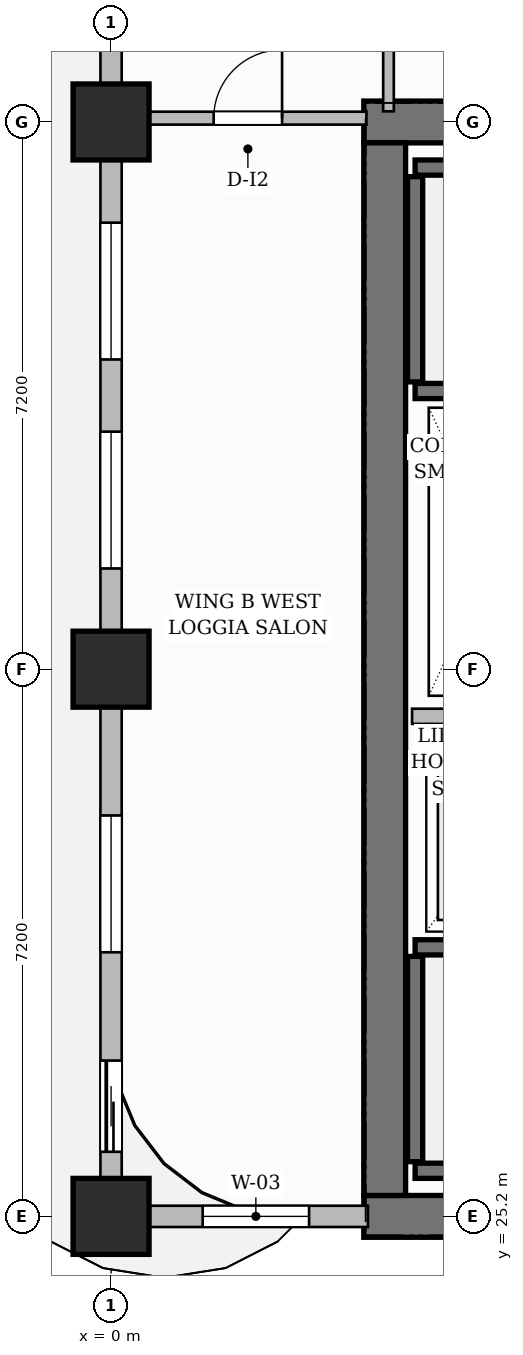
"""IFC4 building model, lengths in metres.
Left out: names, types, materials, properties, quantities, classifications, styles, units other than length and angle.
Written with IfcOpenShell. Run it as: python <this file> out.ifc"""

import sys

from ifc_helpers import new_model, si_unit, direction, frame, frame_2d, origin, origin_2d, place, context, subcontext, project, spatial, rectangle, extrude, source, transform, mapped, element, fill, save


model = new_model("IFC4")
c1 = context("Model", 3, precision=1e-05, world=origin(), true_north=direction((0.0, 1.0)))
c2 = subcontext(c1, "Body", "Model", "MODEL_VIEW")
j1 = project(units=[si_unit("LENGTHUNIT", "METRE"), si_unit("PLANEANGLEUNIT", "RADIAN")], contexts=[c1])
p1 = place(None, origin())
s1 = spatial("IfcSite", under=j1, at=p1, CompositionType="ELEMENT")
p2 = place(p1, origin())
s2 = spatial("IfcBuilding", under=s1, at=p2, CompositionType="ELEMENT")
p3 = place(p2, frame((0.0, 0.0, 126.6)))
s3 = spatial("IfcBuildingStorey", under=s2, at=p3, CompositionType="ELEMENT", Elevation=126.6)
for number, where, z_axis, x_axis in (
    (1, (3.325, 25.2, 0.0), (0.0, 0.0, 1.0), (1.0, 0.0, 0.0)),
    (2, (3.325, 39.6, 0.0), (0.0, 0.0, 1.0), (1.0, 0.0, 0.0)),
):
    element("IfcWall", number, at=place(p3, frame(where, z_axis=z_axis, x_axis=x_axis)), inside=s3, PredefinedType="SHEAR", context=c2, shape_type="SweptSolid", body=[
        extrude(rectangle(XDim=8.35, YDim=0.55, at=frame_2d((4.175, 0.0))), origin(), (0.0, 0.0, 1.0), 3.7),
    ])
p4 = place(p3, frame((3.6, 25.475, 0.0), z_axis=(0.0, 0.0, 1.0), x_axis=(0.0, 1.0, 0.0)))
e3 = element("IfcWall", 3, at=p4, inside=s3, PredefinedType="SHEAR", context=c2, shape_type="SweptSolid", body=[
    extrude(rectangle(XDim=13.85, YDim=0.55, at=frame_2d((6.925, 0.0))), origin(), (0.0, 0.0, 1.0), 3.7),
])
m1 = source(origin(), c2, "Body", "SweptSolid", [
    extrude(rectangle(XDim=1.0, YDim=1.0, at=origin_2d()), origin(), (0.0, 0.0, 1.0), 3.7),
])
for number, where, z_axis, x_axis in (
    (4, (0.0, 25.2, 0.0), (0.0, 0.0, 1.0), (1.0, 0.0, 0.0)),
    (5, (0.0, 32.4, 0.0), (0.0, 0.0, 1.0), (1.0, 0.0, 0.0)),
    (6, (0.0, 39.6, 0.0), (0.0, 0.0, 1.0), (1.0, 0.0, 0.0)),
):
    element("IfcColumn", number, at=place(p3, frame(where, z_axis=z_axis, x_axis=x_axis)), inside=s3, PredefinedType="COLUMN", context=c2, shape_type="MappedRepresentation", body=[
        mapped(m1, transform((0.0, 0.0, 0.0), scale=1.0)),
    ])
p5 = place(p3, frame((4.0, 25.8, 0.0), z_axis=(0.0, 0.0, 1.0), x_axis=(1.0, 0.0, 0.0)))
e7 = element("IfcWall", 7, at=p5, inside=s3, PredefinedType="SHEAR", context=c2, shape_type="SweptSolid", body=[
    extrude(rectangle(XDim=7.1, YDim=0.2, at=frame_2d((3.55, 0.0))), origin(), (0.0, 0.0, 1.0), 3.7),
])
p6 = place(p3, frame((4.0, 25.92, 0.0), z_axis=(0.0, 0.0, 1.0), x_axis=(0.0, 1.0, 0.0)))
e8 = element("IfcWall", 8, at=p6, inside=s3, PredefinedType="SHEAR", context=c2, shape_type="SweptSolid", body=[
    extrude(rectangle(XDim=2.7, YDim=0.2, at=frame_2d((1.35, 0.0))), origin(), (0.0, 0.0, 1.0), 3.7),
])
p7 = place(p3, frame((4.0, 28.74, 0.0), z_axis=(0.0, 0.0, 1.0), x_axis=(1.0, 0.0, 0.0)))
e9 = element("IfcWall", 9, at=p7, inside=s3, PredefinedType="SHEAR", context=c2, shape_type="SweptSolid", body=[
    extrude(rectangle(XDim=7.1, YDim=0.2, at=frame_2d((3.55, 0.0))), origin(), (0.0, 0.0, 1.0), 3.7),
])
p8 = place(p7, frame((5.815, 0.0, 0.0)))
e10 = element("IfcOpeningElement", 10, at=p8, cuts=e9, PredefinedType="OPENING", context=c2, shape_type="SweptSolid", body=[
    extrude(rectangle(XDim=1.05, YDim=2.2, at=frame_2d((0.525, 1.1))), frame((0.0, 0.11, 0.0), z_axis=(0.0, -1.0, 0.0), x_axis=(1.0, 0.0, 0.0)), (0.0, 0.0, 1.0), 0.22),
])
p9 = place(p3, frame((4.0, 39.0, 0.0), z_axis=(0.0, 0.0, 1.0), x_axis=(1.0, 0.0, 0.0)))
e11 = element("IfcWall", 11, at=p9, inside=s3, PredefinedType="SHEAR", context=c2, shape_type="SweptSolid", body=[
    extrude(rectangle(XDim=7.1, YDim=0.2, at=frame_2d((3.55, 0.0))), origin(), (0.0, 0.0, 1.0), 3.7),
])
p10 = place(p3, frame((4.0, 36.18, 0.0), z_axis=(0.0, 0.0, 1.0), x_axis=(0.0, 1.0, 0.0)))
e12 = element("IfcWall", 12, at=p10, inside=s3, PredefinedType="SHEAR", context=c2, shape_type="SweptSolid", body=[
    extrude(rectangle(XDim=2.7, YDim=0.2, at=frame_2d((1.35, 0.0))), origin(), (0.0, 0.0, 1.0), 3.7),
])
p11 = place(p3, frame((4.0, 36.06, 0.0), z_axis=(0.0, 0.0, 1.0), x_axis=(1.0, 0.0, 0.0)))
e13 = element("IfcWall", 13, at=p11, inside=s3, PredefinedType="SHEAR", context=c2, shape_type="SweptSolid", body=[
    extrude(rectangle(XDim=7.1, YDim=0.2, at=frame_2d((3.55, 0.0))), origin(), (0.0, 0.0, 1.0), 3.7),
])
p12 = place(p11, frame((5.815, 0.0, 0.0)))
e14 = element("IfcOpeningElement", 14, at=p12, cuts=e13, PredefinedType="OPENING", context=c2, shape_type="SweptSolid", body=[
    extrude(rectangle(XDim=1.05, YDim=2.2, at=frame_2d((0.525, 1.1))), frame((0.0, 0.11, 0.0), z_axis=(0.0, -1.0, 0.0), x_axis=(1.0, 0.0, 0.0)), (0.0, 0.0, 1.0), 0.22),
])
p13 = place(p3, frame((3.96, 31.78, 0.0), z_axis=(0.0, 0.0, 1.0), x_axis=(1.0, 0.0, 0.0)))
e15 = element("IfcWall", 15, at=p13, inside=s3, PredefinedType="PARTITIONING", context=c2, shape_type="SweptSolid", body=[
    extrude(rectangle(XDim=2.13, YDim=0.2, at=frame_2d((1.065, 0.0))), origin(), (0.0, 0.0, 1.0), 3.45),
])
p14 = place(p3, frame((0.24, 39.65, 0.0), z_axis=(0.0, 0.0, 1.0), x_axis=(1.0, 0.0, 0.0)))
e16 = element("IfcWall", 16, at=p14, inside=s3, PredefinedType="PARTITIONING", context=c2, shape_type="SweptSolid", body=[
    extrude(rectangle(XDim=3.12, YDim=0.17, at=frame_2d((1.56, 0.0))), origin(), (0.0, 0.0, 1.0), 3.45),
])
p15 = place(p14, frame((1.11, 0.0, 0.0)))
e17 = element("IfcOpeningElement", 17, at=p15, cuts=e16, PredefinedType="OPENING", context=c2, shape_type="SweptSolid", body=[
    extrude(rectangle(XDim=0.9, YDim=2.15, at=frame_2d((0.45, 1.075))), frame((0.0, 0.095, 0.0), z_axis=(0.0, -1.0, 0.0), x_axis=(1.0, 0.0, 0.0)), (0.0, 0.0, 1.0), 0.19),
])
p16 = place(p3, frame((3.65, 39.74, 0.0), z_axis=(0.0, 0.0, 1.0), x_axis=(0.0, 1.0, 0.0)))
e18 = element("IfcWall", 18, at=p16, inside=s3, PredefinedType="PARTITIONING", context=c2, shape_type="SweptSolid", body=[
    extrude(rectangle(XDim=1.745, YDim=0.14, at=frame_2d((0.873, 0.0))), origin(), (0.0, 0.0, 1.0), 3.45),
])
p17 = place(p3, frame((0.0, 25.2, 0.0), z_axis=(0.0, 0.0, 1.0), x_axis=(1.0, 0.0, 0.0)))
e19 = element("IfcWall", 19, at=p17, inside=s3, PredefinedType="SOLIDWALL", context=c2, shape_type="SweptSolid", body=[
    extrude(rectangle(XDim=3.38, YDim=0.28, at=frame_2d((1.69, 0.0))), origin(), (0.0, 0.0, 1.0), 3.45),
])
p18 = place(p17, frame((1.205, 0.0, 0.8)))
e20 = element("IfcOpeningElement", 20, at=p18, cuts=e19, PredefinedType="OPENING", context=c2, shape_type="SweptSolid", body=[
    extrude(rectangle(XDim=1.4, YDim=1.85, at=frame_2d((0.7, 0.925))), frame((0.0, 0.15, 0.0), z_axis=(0.0, -1.0, 0.0), x_axis=(1.0, 0.0, 0.0)), (0.0, 0.0, 1.0), 0.3),
])
p19 = place(p3, frame((0.0, 25.25, 0.0), z_axis=(0.0, 0.0, 1.0), x_axis=(0.0, 1.0, 0.0)))
e21 = element("IfcWall", 21, at=p19, inside=s3, PredefinedType="SOLIDWALL", context=c2, shape_type="SweptSolid", body=[
    extrude(rectangle(XDim=21.5, YDim=0.28, at=frame_2d((10.75, 0.0))), origin(), (0.0, 0.0, 1.0), 2.935),
])
p20 = place(p19, frame((18.607, 0.0, 0.0)))
e22 = element("IfcOpeningElement", 22, at=p20, cuts=e21, PredefinedType="OPENING", context=c2, shape_type="SweptSolid", body=[
    extrude(rectangle(XDim=1.2, YDim=2.2, at=frame_2d((0.6, 1.1))), frame((0.0, 0.15, 0.0), z_axis=(0.0, -1.0, 0.0), x_axis=(1.0, 0.0, 0.0)), (0.0, 0.0, 1.0), 0.3),
])
p21 = place(p19, frame((0.8, 0.0, 0.0)))
e23 = element("IfcOpeningElement", 23, at=p21, cuts=e21, PredefinedType="OPENING", context=c2, shape_type="SweptSolid", body=[
    extrude(rectangle(XDim=1.2, YDim=2.2, at=frame_2d((0.6, 1.1))), frame((0.0, 0.15, 0.0), z_axis=(0.0, -1.0, 0.0), x_axis=(1.0, 0.0, 0.0)), (0.0, 0.0, 1.0), 0.3),
])
p22 = place(p19, frame((3.425, 0.0, 0.8)))
e24 = element("IfcOpeningElement", 24, at=p22, cuts=e21, PredefinedType="OPENING", context=c2, shape_type="SweptSolid", body=[
    extrude(rectangle(XDim=1.8, YDim=1.85, at=frame_2d((0.9, 0.925))), frame((0.0, 0.15, 0.0), z_axis=(0.0, -1.0, 0.0), x_axis=(1.0, 0.0, 0.0)), (0.0, 0.0, 1.0), 0.3),
])
p23 = place(p19, frame((8.475, 0.0, 0.8)))
e25 = element("IfcOpeningElement", 25, at=p23, cuts=e21, PredefinedType="OPENING", context=c2, shape_type="SweptSolid", body=[
    extrude(rectangle(XDim=1.8, YDim=1.85, at=frame_2d((0.9, 0.925))), frame((0.0, 0.15, 0.0), z_axis=(0.0, -1.0, 0.0), x_axis=(1.0, 0.0, 0.0)), (0.0, 0.0, 1.0), 0.3),
])
p24 = place(p19, frame((11.225, 0.0, 0.8)))
e26 = element("IfcOpeningElement", 26, at=p24, cuts=e21, PredefinedType="OPENING", context=c2, shape_type="SweptSolid", body=[
    extrude(rectangle(XDim=1.8, YDim=1.85, at=frame_2d((0.9, 0.925))), frame((0.0, 0.15, 0.0), z_axis=(0.0, -1.0, 0.0), x_axis=(1.0, 0.0, 0.0)), (0.0, 0.0, 1.0), 0.3),
])
p25 = place(p19, frame((15.621, 0.0, 0.8)))
e27 = element("IfcOpeningElement", 27, at=p25, cuts=e21, PredefinedType="OPENING", context=c2, shape_type="SweptSolid", body=[
    extrude(rectangle(XDim=1.8, YDim=1.85, at=frame_2d((0.9, 0.925))), frame((0.0, 0.15, 0.0), z_axis=(0.0, -1.0, 0.0), x_axis=(1.0, 0.0, 0.0)), (0.0, 0.0, 1.0), 0.3),
])
m2 = source(origin(), c2, "Body", "SweptSolid", [
    extrude(rectangle(XDim=0.9, YDim=2.15, at=frame_2d((0.45, 1.075))), frame((0.0, 0.025, 0.0), z_axis=(0.0, -1.0, 0.0), x_axis=(1.0, 0.0, 0.0)), (0.0, 0.0, 1.0), 0.05),
])
p26 = place(p15, origin())
e28 = element("IfcDoor", 28, at=p26, inside=s3, OperationType="SINGLE_SWING_RIGHT", PredefinedType="DOOR", context=c2, shape_type="MappedRepresentation", body=[
    mapped(m2, transform((0.0, 0.0, 0.0), scale=1.0)),
])
fill(e17, e28)
m3 = source(origin(), c2, "Body", "SweptSolid", [
    extrude(rectangle(XDim=1.2, YDim=2.2, at=frame_2d((0.6, 1.1))), frame((0.0, 0.025, 0.0), z_axis=(0.0, -1.0, 0.0), x_axis=(1.0, 0.0, 0.0)), (0.0, 0.0, 1.0), 0.05),
])
p27 = place(p21, origin())
e29 = element("IfcDoor", 29, at=p27, inside=s3, OperationType="SLIDING_TO_LEFT", PredefinedType="DOOR", context=c2, shape_type="MappedRepresentation", body=[
    mapped(m3, transform((0.0, 0.0, 0.0), scale=1.0)),
])
fill(e23, e29)
m4 = source(origin(), c2, "Body", "SweptSolid", [
    extrude(rectangle(XDim=1.4, YDim=1.85, at=frame_2d((0.7, 0.925))), frame((0.0, 0.03, 0.0), z_axis=(0.0, -1.0, 0.0), x_axis=(1.0, 0.0, 0.0)), (0.0, 0.0, 1.0), 0.06),
])
p28 = place(p18, origin())
e30 = element("IfcWindow", 30, at=p28, inside=s3, PartitioningType="SINGLE_PANEL", PredefinedType="WINDOW", context=c2, shape_type="MappedRepresentation", body=[
    mapped(m4, transform((0.0, 0.0, 0.0), scale=1.0)),
])
fill(e20, e30)
m5 = source(origin(), c2, "Body", "SweptSolid", [
    extrude(rectangle(XDim=1.8, YDim=1.85, at=frame_2d((0.9, 0.925))), frame((0.0, 0.03, 0.0), z_axis=(0.0, -1.0, 0.0), x_axis=(1.0, 0.0, 0.0)), (0.0, 0.0, 1.0), 0.06),
])
p29 = place(p22, origin())
e31 = element("IfcWindow", 31, at=p29, inside=s3, PartitioningType="DOUBLE_PANEL_VERTICAL", PredefinedType="WINDOW", context=c2, shape_type="MappedRepresentation", body=[
    mapped(m5, transform((0.0, 0.0, 0.0), scale=1.0)),
])
fill(e24, e31)
p30 = place(p23, origin())
e32 = element("IfcWindow", 32, at=p30, inside=s3, PartitioningType="DOUBLE_PANEL_VERTICAL", PredefinedType="WINDOW", context=c2, shape_type="MappedRepresentation", body=[
    mapped(m5, transform((0.0, 0.0, 0.0), scale=1.0)),
])
fill(e25, e32)
p31 = place(p24, origin())
e33 = element("IfcWindow", 33, at=p31, inside=s3, PartitioningType="DOUBLE_PANEL_VERTICAL", PredefinedType="WINDOW", context=c2, shape_type="MappedRepresentation", body=[
    mapped(m5, transform((0.0, 0.0, 0.0), scale=1.0)),
])
fill(e26, e33)
save(model, sys.argv[1])
